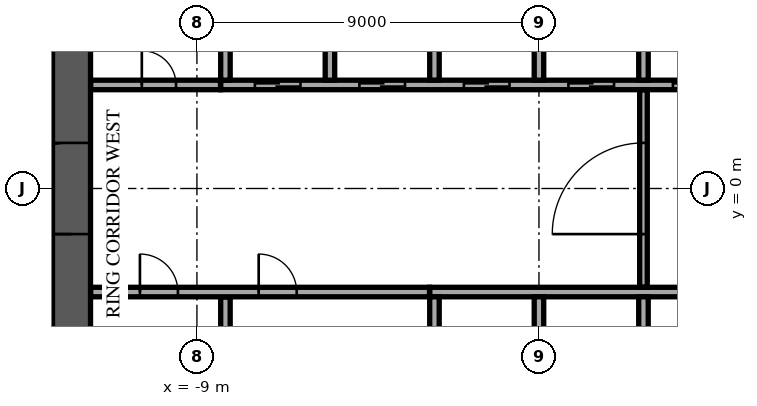
"""IFC4 building model, lengths in metres.
Left out: names, types, materials, properties, quantities, classifications, styles, units other than length and angle.
Written with IfcOpenShell. Run it as: python <this file> out.ifc"""

import sys

from ifc_helpers import new_model, si_unit, direction, frame, frame_2d, origin, place, context, subcontext, project, spatial, rectangle, extrude, element, fill, save


model = new_model("IFC4")
c1 = context("Model", 3, precision=1e-05, world=origin(), true_north=direction((0.0, 1.0)))
c2 = subcontext(c1, "Body", "Model", "MODEL_VIEW")
j1 = project(units=[si_unit("LENGTHUNIT", "METRE"), si_unit("PLANEANGLEUNIT", "RADIAN")], contexts=[c1])
p1 = place(None, origin())
s1 = spatial("IfcSite", under=j1, at=p1, CompositionType="ELEMENT")
p2 = place(p1, origin())
s2 = spatial("IfcBuilding", under=s1, at=p2, CompositionType="ELEMENT")
p3 = place(p2, frame((0.0, 0.0, 175.7)))
s3 = spatial("IfcBuildingStorey", under=s2, at=p3, CompositionType="ELEMENT", Elevation=175.7)
p4 = place(p3, frame((-12.3, -11.8, 0.0), z_axis=(0.0, 0.0, 1.0), x_axis=(0.0, 1.0, 0.0)))
e1 = element("IfcWall", 1, at=p4, inside=s3, PredefinedType="SHEAR", context=c2, shape_type="SweptSolid", body=[
    extrude(rectangle(XDim=23.6, YDim=1.0, at=frame_2d((11.8, 0.0))), origin(), (0.0, 0.0, 1.0), 3.6),
])
p5 = place(p4, frame((10.6, 0.0, 0.0)))
e2 = element("IfcOpeningElement", 2, at=p5, cuts=e1, PredefinedType="OPENING", context=c2, shape_type="SweptSolid", body=[
    extrude(rectangle(XDim=2.4, YDim=2.4, at=frame_2d((1.2, 1.2))), frame((0.0, 0.51, 0.0), z_axis=(0.0, -1.0, 0.0), x_axis=(1.0, 0.0, 0.0)), (0.0, 0.0, 1.0), 1.02),
])
p6 = place(p3, frame((-8.375, 2.725, 0.0), z_axis=(0.0, 0.0, 1.0), x_axis=(1.0, 0.0, 0.0)))
e3 = element("IfcWall", 3, at=p6, inside=s3, PredefinedType="SOLIDWALL", context=c2, shape_type="SweptSolid", body=[
    extrude(rectangle(XDim=16.75, YDim=0.25, at=frame_2d((8.375, 0.0))), origin(), (0.0, 0.0, 1.0), 3.6),
])
p7 = place(p6, frame((0.9, 0.0, 0.0)))
e4 = element("IfcOpeningElement", 4, at=p7, cuts=e3, PredefinedType="OPENING", context=c2, shape_type="SweptSolid", body=[
    extrude(rectangle(XDim=1.2, YDim=2.1, at=frame_2d((0.6, 1.05))), frame((0.0, 0.135, 0.0), z_axis=(0.0, -1.0, 0.0), x_axis=(1.0, 0.0, 0.0)), (0.0, 0.0, 1.0), 0.27),
])
p8 = place(p6, frame((3.65, 0.0, 0.0)))
e5 = element("IfcOpeningElement", 5, at=p8, cuts=e3, PredefinedType="OPENING", context=c2, shape_type="SweptSolid", body=[
    extrude(rectangle(XDim=1.2, YDim=2.1, at=frame_2d((0.6, 1.05))), frame((0.0, 0.135, 0.0), z_axis=(0.0, -1.0, 0.0), x_axis=(1.0, 0.0, 0.0)), (0.0, 0.0, 1.0), 0.27),
])
p9 = place(p6, frame((6.4, 0.0, 0.0)))
e6 = element("IfcOpeningElement", 6, at=p9, cuts=e3, PredefinedType="OPENING", context=c2, shape_type="SweptSolid", body=[
    extrude(rectangle(XDim=1.2, YDim=2.1, at=frame_2d((0.6, 1.05))), frame((0.0, 0.135, 0.0), z_axis=(0.0, -1.0, 0.0), x_axis=(1.0, 0.0, 0.0)), (0.0, 0.0, 1.0), 0.27),
])
p10 = place(p6, frame((9.15, 0.0, 0.0)))
e7 = element("IfcOpeningElement", 7, at=p10, cuts=e3, PredefinedType="OPENING", context=c2, shape_type="SweptSolid", body=[
    extrude(rectangle(XDim=1.2, YDim=2.1, at=frame_2d((0.6, 1.05))), frame((0.0, 0.135, 0.0), z_axis=(0.0, -1.0, 0.0), x_axis=(1.0, 0.0, 0.0)), (0.0, 0.0, 1.0), 0.27),
])
p11 = place(p6, frame((11.9, 0.0, 0.0)))
e8 = element("IfcOpeningElement", 8, at=p11, cuts=e3, PredefinedType="OPENING", context=c2, shape_type="SweptSolid", body=[
    extrude(rectangle(XDim=1.2, YDim=2.1, at=frame_2d((0.6, 1.05))), frame((0.0, 0.135, 0.0), z_axis=(0.0, -1.0, 0.0), x_axis=(1.0, 0.0, 0.0)), (0.0, 0.0, 1.0), 0.27),
])
p12 = place(p6, frame((14.65, 0.0, 0.0)))
e9 = element("IfcOpeningElement", 9, at=p12, cuts=e3, PredefinedType="OPENING", context=c2, shape_type="SweptSolid", body=[
    extrude(rectangle(XDim=1.2, YDim=2.1, at=frame_2d((0.6, 1.05))), frame((0.0, 0.135, 0.0), z_axis=(0.0, -1.0, 0.0), x_axis=(1.0, 0.0, 0.0)), (0.0, 0.0, 1.0), 0.27),
])
for number, where, z_axis, x_axis in (
    (10, (-8.25, 2.85, 0.0), (0.0, 0.0, 1.0), (0.0, 1.0, 0.0)),
    (11, (-5.5, 2.85, 0.0), (0.0, 0.0, 1.0), (0.0, 1.0, 0.0)),
    (12, (-2.75, 2.85, 0.0), (0.0, 0.0, 1.0), (0.0, 1.0, 0.0)),
    (13, (0.0, 2.85, 0.0), (0.0, 0.0, 1.0), (0.0, 1.0, 0.0)),
    (14, (2.75, 2.85, 0.0), (0.0, 0.0, 1.0), (0.0, 1.0, 0.0)),
):
    element("IfcWall", number, at=place(p3, frame(where, z_axis=z_axis, x_axis=x_axis)), inside=s3, PredefinedType="SOLIDWALL", context=c2, shape_type="SweptSolid", body=[
        extrude(rectangle(XDim=2.7, YDim=0.25, at=frame_2d((1.35, 0.0))), origin(), (0.0, 0.0, 1.0), 3.6),
    ])
p13 = place(p3, frame((-2.875, -2.725, 0.0), z_axis=(0.0, 0.0, 1.0), x_axis=(1.0, 0.0, 0.0)))
e15 = element("IfcWall", 15, at=p13, inside=s3, PredefinedType="SOLIDWALL", context=c2, shape_type="SweptSolid", body=[
    extrude(rectangle(XDim=8.5, YDim=0.25, at=frame_2d((4.25, 0.0))), origin(), (0.0, 0.0, 1.0), 3.6),
])
for number, where, z_axis, x_axis in (
    (16, (-2.75, -5.55, 0.0), (0.0, 0.0, 1.0), (0.0, 1.0, 0.0)),
    (17, (0.0, -5.55, 0.0), (0.0, 0.0, 1.0), (0.0, 1.0, 0.0)),
    (18, (2.75, -5.55, 0.0), (0.0, 0.0, 1.0), (0.0, 1.0, 0.0)),
):
    element("IfcWall", number, at=place(p3, frame(where, z_axis=z_axis, x_axis=x_axis)), inside=s3, PredefinedType="SOLIDWALL", context=c2, shape_type="SweptSolid", body=[
        extrude(rectangle(XDim=2.7, YDim=0.25, at=frame_2d((1.35, 0.0))), origin(), (0.0, 0.0, 1.0), 3.6),
    ])
p14 = place(p3, frame((-8.25, -5.545, 0.0), z_axis=(0.0, 0.0, 1.0), x_axis=(0.0, 1.0, 0.0)))
e19 = element("IfcWall", 19, at=p14, inside=s3, PredefinedType="PARTITIONING", context=c2, shape_type="SweptSolid", body=[
    extrude(rectangle(XDim=2.69, YDim=0.25, at=frame_2d((1.345, 0.0))), origin(), (0.0, 0.0, 1.0), 3.6),
])
p15 = place(p3, frame((-11.795, -2.725, 0.0), z_axis=(0.0, 0.0, 1.0), x_axis=(1.0, 0.0, 0.0)))
e20 = element("IfcWall", 20, at=p15, inside=s3, PredefinedType="PARTITIONING", context=c2, shape_type="SweptSolid", body=[
    extrude(rectangle(XDim=8.915, YDim=0.25, at=frame_2d((4.458, 0.0))), origin(), (0.0, 0.0, 1.0), 3.6),
])
p16 = place(p15, frame((1.295, 0.0, 0.0)))
e21 = element("IfcOpeningElement", 21, at=p16, cuts=e20, PredefinedType="OPENING", context=c2, shape_type="SweptSolid", body=[
    extrude(rectangle(XDim=1.0, YDim=2.1, at=frame_2d((0.5, 1.05))), frame((0.0, 0.135, 0.0), z_axis=(0.0, -1.0, 0.0), x_axis=(1.0, 0.0, 0.0)), (0.0, 0.0, 1.0), 0.27),
])
p17 = place(p15, frame((4.42, 0.0, 0.0)))
e22 = element("IfcOpeningElement", 22, at=p17, cuts=e20, PredefinedType="OPENING", context=c2, shape_type="SweptSolid", body=[
    extrude(rectangle(XDim=1.0, YDim=2.1, at=frame_2d((0.5, 1.05))), frame((0.0, 0.135, 0.0), z_axis=(0.0, -1.0, 0.0), x_axis=(1.0, 0.0, 0.0)), (0.0, 0.0, 1.0), 0.27),
])
p18 = place(p3, frame((2.75, -2.595, 0.0), z_axis=(0.0, 0.0, 1.0), x_axis=(0.0, 1.0, 0.0)))
e23 = element("IfcWall", 23, at=p18, inside=s3, PredefinedType="PARTITIONING", context=c2, shape_type="SweptSolid", body=[
    extrude(rectangle(XDim=5.19, YDim=0.2, at=frame_2d((2.595, 0.0))), origin(), (0.0, 0.0, 1.0), 3.6),
])
p19 = place(p18, frame((1.395, 0.0, 0.0)))
e24 = element("IfcOpeningElement", 24, at=p19, cuts=e23, PredefinedType="OPENING", context=c2, shape_type="SweptSolid", body=[
    extrude(rectangle(XDim=2.4, YDim=2.4, at=frame_2d((1.2, 1.2))), frame((0.0, 0.11, 0.0), z_axis=(0.0, -1.0, 0.0), x_axis=(1.0, 0.0, 0.0)), (0.0, 0.0, 1.0), 0.22),
])
p20 = place(p3, frame((-11.795, 2.725, 0.0), z_axis=(0.0, 0.0, 1.0), x_axis=(1.0, 0.0, 0.0)))
e25 = element("IfcWall", 25, at=p20, inside=s3, PredefinedType="PARTITIONING", context=c2, shape_type="SweptSolid", body=[
    extrude(rectangle(XDim=3.415, YDim=0.25, at=frame_2d((1.708, 0.0))), origin(), (0.0, 0.0, 1.0), 3.6),
])
p21 = place(p20, frame((1.345, 0.0, 0.0)))
e26 = element("IfcOpeningElement", 26, at=p21, cuts=e25, PredefinedType="OPENING", context=c2, shape_type="SweptSolid", body=[
    extrude(rectangle(XDim=0.9, YDim=2.1, at=frame_2d((0.45, 1.05))), frame((0.0, 0.135, 0.0), z_axis=(0.0, -1.0, 0.0), x_axis=(1.0, 0.0, 0.0)), (0.0, 0.0, 1.0), 0.27),
])
p22 = place(p3, frame((-36.503, -1.52, 0.0), z_axis=(0.0, 0.0, 1.0), x_axis=(0.615658293455, -0.788013239546, 0.0)))
e27 = element("IfcWall", 27, at=p22, inside=s3, PredefinedType="STANDARD", context=c2, shape_type="SweptSolid", body=[
    extrude(rectangle(XDim=42.552, YDim=0.6, at=frame_2d((21.276, 0.0))), origin(), (0.0, 0.0, 1.0), 3.6),
])
p23 = place(p22, frame((1.178, 0.0, 0.9)))
e28 = element("IfcOpeningElement", 28, at=p23, cuts=e27, PredefinedType="OPENING", context=c2, shape_type="SweptSolid", body=[
    extrude(rectangle(XDim=1.8, YDim=2.1, at=frame_2d((0.9, 1.05))), frame((0.0, 0.31, 0.0), z_axis=(0.0, -1.0, 0.0), x_axis=(1.0, 0.0, 0.0)), (0.0, 0.0, 1.0), 0.62),
])
p24 = place(p22, frame((5.396, 0.0, 0.9)))
e29 = element("IfcOpeningElement", 29, at=p24, cuts=e27, PredefinedType="OPENING", context=c2, shape_type="SweptSolid", body=[
    extrude(rectangle(XDim=1.8, YDim=2.1, at=frame_2d((0.9, 1.05))), frame((0.0, 0.31, 0.0), z_axis=(0.0, -1.0, 0.0), x_axis=(1.0, 0.0, 0.0)), (0.0, 0.0, 1.0), 0.62),
])
p25 = place(p22, frame((9.676, 0.0, 0.9)))
e30 = element("IfcOpeningElement", 30, at=p25, cuts=e27, PredefinedType="OPENING", context=c2, shape_type="SweptSolid", body=[
    extrude(rectangle(XDim=1.8, YDim=2.1, at=frame_2d((0.9, 1.05))), frame((0.0, 0.31, 0.0), z_axis=(0.0, -1.0, 0.0), x_axis=(1.0, 0.0, 0.0)), (0.0, 0.0, 1.0), 0.62),
])
p26 = place(p22, frame((13.956, 0.0, 0.9)))
e31 = element("IfcOpeningElement", 31, at=p26, cuts=e27, PredefinedType="OPENING", context=c2, shape_type="SweptSolid", body=[
    extrude(rectangle(XDim=1.8, YDim=2.1, at=frame_2d((0.9, 1.05))), frame((0.0, 0.31, 0.0), z_axis=(0.0, -1.0, 0.0), x_axis=(1.0, 0.0, 0.0)), (0.0, 0.0, 1.0), 0.62),
])
p27 = place(p22, frame((18.236, 0.0, 0.9)))
e32 = element("IfcOpeningElement", 32, at=p27, cuts=e27, PredefinedType="OPENING", context=c2, shape_type="SweptSolid", body=[
    extrude(rectangle(XDim=1.8, YDim=2.1, at=frame_2d((0.9, 1.05))), frame((0.0, 0.31, 0.0), z_axis=(0.0, -1.0, 0.0), x_axis=(1.0, 0.0, 0.0)), (0.0, 0.0, 1.0), 0.62),
])
p28 = place(p22, frame((22.516, 0.0, 0.9)))
e33 = element("IfcOpeningElement", 33, at=p28, cuts=e27, PredefinedType="OPENING", context=c2, shape_type="SweptSolid", body=[
    extrude(rectangle(XDim=1.8, YDim=2.1, at=frame_2d((0.9, 1.05))), frame((0.0, 0.31, 0.0), z_axis=(0.0, -1.0, 0.0), x_axis=(1.0, 0.0, 0.0)), (0.0, 0.0, 1.0), 0.62),
])
p29 = place(p22, frame((26.796, 0.0, 0.9)))
e34 = element("IfcOpeningElement", 34, at=p29, cuts=e27, PredefinedType="OPENING", context=c2, shape_type="SweptSolid", body=[
    extrude(rectangle(XDim=1.8, YDim=2.1, at=frame_2d((0.9, 1.05))), frame((0.0, 0.31, 0.0), z_axis=(0.0, -1.0, 0.0), x_axis=(1.0, 0.0, 0.0)), (0.0, 0.0, 1.0), 0.62),
])
p30 = place(p22, frame((35.356, 0.0, 0.9)))
e35 = element("IfcOpeningElement", 35, at=p30, cuts=e27, PredefinedType="OPENING", context=c2, shape_type="SweptSolid", body=[
    extrude(rectangle(XDim=1.8, YDim=2.1, at=frame_2d((0.9, 1.05))), frame((0.0, 0.31, 0.0), z_axis=(0.0, -1.0, 0.0), x_axis=(1.0, 0.0, 0.0)), (0.0, 0.0, 1.0), 0.62),
])
p31 = place(p22, frame((39.573, 0.0, 0.9)))
e36 = element("IfcOpeningElement", 36, at=p31, cuts=e27, PredefinedType="OPENING", context=c2, shape_type="SweptSolid", body=[
    extrude(rectangle(XDim=1.8, YDim=2.1, at=frame_2d((0.9, 1.05))), frame((0.0, 0.31, 0.0), z_axis=(0.0, -1.0, 0.0), x_axis=(1.0, 0.0, 0.0)), (0.0, 0.0, 1.0), 0.62),
])
p32 = place(p3, frame((-26.789, -3.331, 0.0), z_axis=(0.0, 0.0, 1.0), x_axis=(0.615659714696, -0.788012129158, 0.0)))
e37 = element("IfcWall", 37, at=p32, inside=s3, PredefinedType="PARTITIONING", context=c2, shape_type="SweptSolid", body=[
    extrude(rectangle(XDim=27.811, YDim=0.15, at=frame_2d((13.905, 0.0))), origin(), (0.0, 0.0, 1.0), 3.15),
])
p33 = place(p32, frame((15.872, 0.0, 0.0)))
e38 = element("IfcOpeningElement", 38, at=p33, cuts=e37, PredefinedType="OPENING", context=c2, shape_type="SweptSolid", body=[
    extrude(rectangle(XDim=1.0, YDim=2.1, at=frame_2d((0.5, 1.05))), frame((0.0, 0.085, 0.0), z_axis=(0.0, -1.0, 0.0), x_axis=(1.0, 0.0, 0.0)), (0.0, 0.0, 1.0), 0.17),
])
p34 = place(p5, origin())
e39 = element("IfcDoor", 39, at=p34, inside=s3, OperationType="SINGLE_SWING_LEFT", PredefinedType="DOOR", context=c2, shape_type="SweptSolid", body=[
    extrude(rectangle(XDim=2.4, YDim=2.4, at=frame_2d((1.2, 1.2))), frame((0.0, 0.025, 0.0), z_axis=(0.0, -1.0, 0.0), x_axis=(1.0, 0.0, 0.0)), (0.0, 0.0, 1.0), 0.05),
])
fill(e2, e39)
p35 = place(p7, origin())
e40 = element("IfcDoor", 40, at=p35, inside=s3, OperationType="DOUBLE_DOOR_SLIDING", PredefinedType="DOOR", context=c2, shape_type="SweptSolid", body=[
    extrude(rectangle(XDim=1.2, YDim=2.1, at=frame_2d((0.6, 1.05))), frame((0.0, 0.025, 0.0), z_axis=(0.0, -1.0, 0.0), x_axis=(1.0, 0.0, 0.0)), (0.0, 0.0, 1.0), 0.05),
])
fill(e4, e40)
p36 = place(p8, origin())
e41 = element("IfcDoor", 41, at=p36, inside=s3, OperationType="DOUBLE_DOOR_SLIDING", PredefinedType="DOOR", context=c2, shape_type="SweptSolid", body=[
    extrude(rectangle(XDim=1.2, YDim=2.1, at=frame_2d((0.6, 1.05))), frame((0.0, 0.025, 0.0), z_axis=(0.0, -1.0, 0.0), x_axis=(1.0, 0.0, 0.0)), (0.0, 0.0, 1.0), 0.05),
])
fill(e5, e41)
p37 = place(p9, origin())
e42 = element("IfcDoor", 42, at=p37, inside=s3, OperationType="DOUBLE_DOOR_SLIDING", PredefinedType="DOOR", context=c2, shape_type="SweptSolid", body=[
    extrude(rectangle(XDim=1.2, YDim=2.1, at=frame_2d((0.6, 1.05))), frame((0.0, 0.025, 0.0), z_axis=(0.0, -1.0, 0.0), x_axis=(1.0, 0.0, 0.0)), (0.0, 0.0, 1.0), 0.05),
])
fill(e6, e42)
p38 = place(p10, origin())
e43 = element("IfcDoor", 43, at=p38, inside=s3, OperationType="DOUBLE_DOOR_SLIDING", PredefinedType="DOOR", context=c2, shape_type="SweptSolid", body=[
    extrude(rectangle(XDim=1.2, YDim=2.1, at=frame_2d((0.6, 1.05))), frame((0.0, 0.025, 0.0), z_axis=(0.0, -1.0, 0.0), x_axis=(1.0, 0.0, 0.0)), (0.0, 0.0, 1.0), 0.05),
])
fill(e7, e43)
p39 = place(p11, origin())
e44 = element("IfcDoor", 44, at=p39, inside=s3, OperationType="DOUBLE_DOOR_SLIDING", PredefinedType="DOOR", context=c2, shape_type="SweptSolid", body=[
    extrude(rectangle(XDim=1.2, YDim=2.1, at=frame_2d((0.6, 1.05))), frame((0.0, 0.025, 0.0), z_axis=(0.0, -1.0, 0.0), x_axis=(1.0, 0.0, 0.0)), (0.0, 0.0, 1.0), 0.05),
])
fill(e8, e44)
p40 = place(p16, origin())
e45 = element("IfcDoor", 45, at=p40, inside=s3, OperationType="SINGLE_SWING_RIGHT", PredefinedType="DOOR", context=c2, shape_type="SweptSolid", body=[
    extrude(rectangle(XDim=1.0, YDim=2.1, at=frame_2d((0.5, 1.05))), frame((0.0, 0.025, 0.0), z_axis=(0.0, -1.0, 0.0), x_axis=(1.0, 0.0, 0.0)), (0.0, 0.0, 1.0), 0.05),
])
fill(e21, e45)
p41 = place(p21, origin())
e46 = element("IfcDoor", 46, at=p41, inside=s3, OperationType="SINGLE_SWING_RIGHT", PredefinedType="DOOR", context=c2, shape_type="SweptSolid", body=[
    extrude(rectangle(XDim=0.9, YDim=2.1, at=frame_2d((0.45, 1.05))), frame((0.0, 0.025, 0.0), z_axis=(0.0, -1.0, 0.0), x_axis=(1.0, 0.0, 0.0)), (0.0, 0.0, 1.0), 0.05),
])
fill(e26, e46)
p42 = place(p17, origin())
e47 = element("IfcDoor", 47, at=p42, inside=s3, OperationType="SINGLE_SWING_RIGHT", PredefinedType="DOOR", context=c2, shape_type="SweptSolid", body=[
    extrude(rectangle(XDim=1.0, YDim=2.1, at=frame_2d((0.5, 1.05))), frame((0.0, 0.025, 0.0), z_axis=(0.0, -1.0, 0.0), x_axis=(1.0, 0.0, 0.0)), (0.0, 0.0, 1.0), 0.05),
])
fill(e22, e47)
p43 = place(p19, origin())
e48 = element("IfcDoor", 48, at=p43, inside=s3, OperationType="DOUBLE_DOOR_DOUBLE_SWING", PredefinedType="DOOR", context=c2, shape_type="SweptSolid", body=[
    extrude(rectangle(XDim=2.4, YDim=2.4, at=frame_2d((1.2, 1.2))), frame((0.0, 0.025, 0.0), z_axis=(0.0, -1.0, 0.0), x_axis=(1.0, 0.0, 0.0)), (0.0, 0.0, 1.0), 0.05),
])
fill(e24, e48)
save(model, sys.argv[1])
